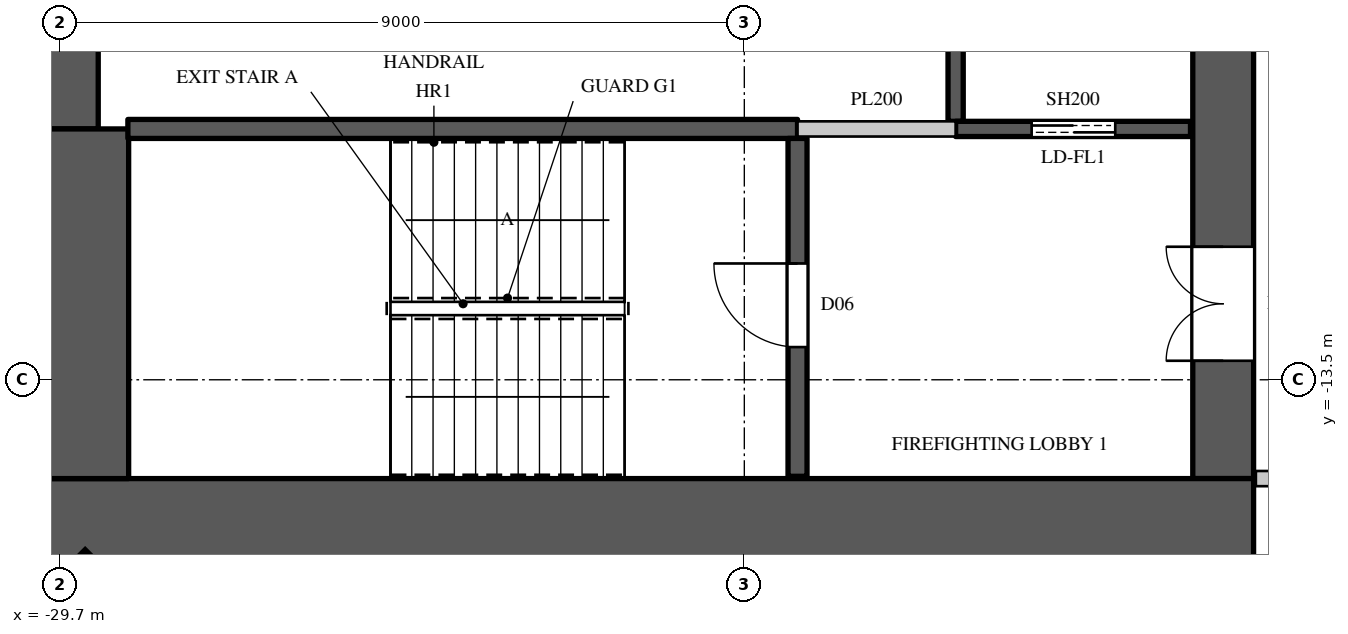
"""IFC4 building model, lengths in metres.
Left out: names, types, materials, properties, quantities, classifications, styles, units other than length and angle.
Written with IfcOpenShell. Run it as: python <this file> out.ifc"""

import sys

from ifc_helpers import new_model, si_unit, direction, frame, frame_2d, origin, origin_2d, place, context, subcontext, project, spatial, rectangle, extrude, element, fill, save


model = new_model("IFC4")
c1 = context("Model", 3, precision=1e-05, world=origin(), true_north=direction((0.0, 1.0)))
c2 = subcontext(c1, "Body", "Model", "MODEL_VIEW")
j1 = project(units=[si_unit("LENGTHUNIT", "METRE"), si_unit("PLANEANGLEUNIT", "RADIAN")], contexts=[c1])
p1 = place(None, origin())
s1 = spatial("IfcSite", under=j1, at=p1, CompositionType="ELEMENT")
p2 = place(p1, origin())
s2 = spatial("IfcBuilding", under=s1, at=p2, CompositionType="ELEMENT")
p3 = place(p2, frame((0.0, 0.0, 197.4)))
s3 = spatial("IfcBuildingStorey", under=s2, at=p3, CompositionType="ELEMENT", Elevation=197.4)
p4 = place(p3, frame((-29.443, -16.443, 0.0), z_axis=(0.0, 0.0, 1.0), x_axis=(0.707106781187, -0.707106781187, 0.0)))
e1 = element("IfcColumn", 1, at=p4, inside=s3, PredefinedType="COLUMN", context=c2, shape_type="SweptSolid", body=[
    extrude(rectangle(XDim=0.9, YDim=1.1, at=origin_2d()), origin(), (0.0, 0.0, 1.0), 4.1),
])
p5 = place(p3, frame((-30.0, -15.4, 0.0), z_axis=(0.0, 0.0, 1.0), x_axis=(1.0, 0.0, 0.0)))
e2 = element("IfcWall", 2, at=p5, inside=s3, PredefinedType="SHEAR", context=c2, shape_type="SweptSolid", body=[
    extrude(rectangle(XDim=16.0, YDim=1.2, at=frame_2d((8.0, 0.0))), origin(), (0.0, 0.0, 1.0), 4.1),
])
p6 = place(p3, frame((-14.4, -14.8, 0.0), z_axis=(0.0, 0.0, 1.0), x_axis=(0.0, 1.0, 0.0)))
e3 = element("IfcWall", 3, at=p6, inside=s3, PredefinedType="SHEAR", context=c2, shape_type="SweptSolid", body=[
    extrude(rectangle(XDim=29.6, YDim=0.8, at=frame_2d((14.8, 0.0))), origin(), (0.0, 0.0, 1.0), 4.1),
])
p7 = place(p6, frame((1.55, 0.0, 0.0)))
e4 = element("IfcOpeningElement", 4, at=p7, cuts=e3, PredefinedType="OPENING", context=c2, shape_type="SweptSolid", body=[
    extrude(rectangle(XDim=1.5, YDim=2.4, at=frame_2d((0.75, 1.2))), frame((0.0, 0.41, 0.0), z_axis=(0.0, -1.0, 0.0), x_axis=(1.0, 0.0, 0.0)), (0.0, 0.0, 1.0), 0.82),
])
p8 = place(p6, frame((26.55, 0.0, 0.0)))
e5 = element("IfcOpeningElement", 5, at=p8, cuts=e3, PredefinedType="OPENING", context=c2, shape_type="SweptSolid", body=[
    extrude(rectangle(XDim=1.5, YDim=2.4, at=frame_2d((0.75, 1.2))), frame((0.0, 0.41, 0.0), z_axis=(0.0, -1.0, 0.0), x_axis=(1.0, 0.0, 0.0)), (0.0, 0.0, 1.0), 0.82),
])
p9 = place(p6, frame((8.45, 0.0, 0.0)))
e6 = element("IfcOpeningElement", 6, at=p9, cuts=e3, PredefinedType="OPENING", context=c2, shape_type="SweptSolid", body=[
    extrude(rectangle(XDim=1.5, YDim=2.4, at=frame_2d((0.75, 1.2))), frame((0.0, 0.41, 0.0), z_axis=(0.0, -1.0, 0.0), x_axis=(1.0, 0.0, 0.0)), (0.0, 0.0, 1.0), 0.82),
])
p10 = place(p6, frame((19.65, 0.0, 0.0)))
e7 = element("IfcOpeningElement", 7, at=p10, cuts=e3, PredefinedType="OPENING", context=c2, shape_type="SweptSolid", body=[
    extrude(rectangle(XDim=1.5, YDim=2.4, at=frame_2d((0.75, 1.2))), frame((0.0, 0.41, 0.0), z_axis=(0.0, -1.0, 0.0), x_axis=(1.0, 0.0, 0.0)), (0.0, 0.0, 1.0), 0.82),
])
p11 = place(p6, frame((14.5, 0.0, 0.0)))
e8 = element("IfcOpeningElement", 8, at=p11, cuts=e3, PredefinedType="OPENING", context=c2, shape_type="SweptSolid", body=[
    extrude(rectangle(XDim=0.6, YDim=2.0, at=frame_2d((0.3, 1.0))), frame((0.0, 0.41, 0.0), z_axis=(0.0, -1.0, 0.0), x_axis=(1.0, 0.0, 0.0)), (0.0, 0.0, 1.0), 0.82),
])
p12 = place(p3, frame((-29.6, -10.2, 0.0), z_axis=(0.0, 0.0, 1.0), x_axis=(0.0, 1.0, 0.0)))
e9 = element("IfcWall", 9, at=p12, inside=s3, PredefinedType="SHEAR", context=c2, shape_type="SweptSolid", body=[
    extrude(rectangle(XDim=20.4, YDim=0.8, at=frame_2d((10.2, 0.0))), origin(), (0.0, 0.0, 1.0), 4.1),
])
p13 = place(p3, frame((-29.4, -14.8, 0.0), z_axis=(0.0, 0.0, 1.0), x_axis=(0.0, 1.0, 0.0)))
e10 = element("IfcWall", 10, at=p13, inside=s3, PredefinedType="SHEAR", context=c2, shape_type="SweptSolid", body=[
    extrude(rectangle(XDim=4.6, YDim=1.2, at=frame_2d((2.3, 0.0))), origin(), (0.0, 0.0, 1.0), 4.1),
])
p14 = place(p3, frame((-13.97, -14.8, 0.0), z_axis=(0.0, 0.0, 1.0), x_axis=(1.0, 0.0, 0.0)))
e11 = element("IfcWall", 11, at=p14, inside=s3, PredefinedType="PARTITIONING", context=c2, shape_type="SweptSolid", body=[
    extrude(rectangle(XDim=2.87, YDim=0.2, at=frame_2d((1.435, 0.0))), origin(), (0.0, 0.0, 1.0), 3.8),
])
p15 = place(p3, frame((-20.0, -10.2, 0.0), z_axis=(0.0, 0.0, 1.0), x_axis=(1.0, 0.0, 0.0)))
e12 = element("IfcWall", 12, at=p15, inside=s3, PredefinedType="PARTITIONING", context=c2, shape_type="SweptSolid", body=[
    extrude(rectangle(XDim=2.08, YDim=0.2, at=frame_2d((1.04, 0.0))), origin(), (0.0, 0.0, 1.0), 3.8),
])
p16 = place(p3, frame((-17.92, -10.1, 0.0), z_axis=(0.0, 0.0, 1.0), x_axis=(0.0, 1.0, 0.0)))
e13 = element("IfcWall", 13, at=p16, inside=s3, PredefinedType="SHEAR", context=c2, shape_type="SweptSolid", body=[
    extrude(rectangle(XDim=2.6, YDim=0.2, at=frame_2d((1.3, 0.0))), origin(), (0.0, 0.0, 1.0), 3.8),
])
p17 = place(p3, frame((-17.92, -10.2, 0.0), z_axis=(0.0, 0.0, 1.0), x_axis=(1.0, 0.0, 0.0)))
e14 = element("IfcWall", 14, at=p17, inside=s3, PredefinedType="SHEAR", context=c2, shape_type="SweptSolid", body=[
    extrude(rectangle(XDim=3.09, YDim=0.2, at=frame_2d((1.545, 0.0))), origin(), (0.0, 0.0, 1.0), 3.8),
])
p18 = place(p17, frame((1.0, 0.0, 0.0)))
e15 = element("IfcOpeningElement", 15, at=p18, cuts=e14, PredefinedType="OPENING", context=c2, shape_type="SweptSolid", body=[
    extrude(rectangle(XDim=1.1, YDim=2.2, at=frame_2d((0.55, 1.1))), frame((0.0, 0.11, 0.0), z_axis=(0.0, -1.0, 0.0), x_axis=(1.0, 0.0, 0.0)), (0.0, 0.0, 1.0), 0.22),
])
p19 = place(p3, frame((-28.81, -10.2, 0.0), z_axis=(0.0, 0.0, 1.0), x_axis=(1.0, 0.0, 0.0)))
e16 = element("IfcWall", 16, at=p19, inside=s3, PredefinedType="SHEAR", context=c2, shape_type="SweptSolid", body=[
    extrude(rectangle(XDim=8.81, YDim=0.25, at=frame_2d((4.405, 0.0))), origin(), (0.0, 0.0, 1.0), 3.8),
])
p20 = place(p3, frame((-20.0, -14.77, 0.0), z_axis=(0.0, 0.0, 1.0), x_axis=(0.0, 1.0, 0.0)))
e17 = element("IfcWall", 17, at=p20, inside=s3, PredefinedType="SHEAR", context=c2, shape_type="SweptSolid", body=[
    extrude(rectangle(XDim=4.445, YDim=0.25, at=frame_2d((2.223, 0.0))), origin(), (0.0, 0.0, 1.0), 3.8),
])
p21 = place(p20, frame((1.7, 0.0, 0.0)))
e18 = element("IfcOpeningElement", 18, at=p21, cuts=e17, PredefinedType="OPENING", context=c2, shape_type="SweptSolid", body=[
    extrude(rectangle(XDim=1.1, YDim=2.2, at=frame_2d((0.55, 1.1))), frame((0.0, 0.135, 0.0), z_axis=(0.0, -1.0, 0.0), x_axis=(1.0, 0.0, 0.0)), (0.0, 0.0, 1.0), 0.27),
])
p22 = place(p21, origin())
e19 = element("IfcDoor", 19, at=p22, inside=s3, OperationType="SINGLE_SWING_RIGHT", PredefinedType="DOOR", context=c2, shape_type="SweptSolid", body=[
    extrude(rectangle(XDim=1.1, YDim=2.2, at=frame_2d((0.55, 1.1))), frame((0.0, 0.025, 0.0), z_axis=(0.0, -1.0, 0.0), x_axis=(1.0, 0.0, 0.0)), (0.0, 0.0, 1.0), 0.05),
])
fill(e18, e19)
p23 = place(p18, origin())
e20 = element("IfcDoor", 20, at=p23, inside=s3, OperationType="DOUBLE_DOOR_SLIDING", PredefinedType="DOOR", context=c2, shape_type="SweptSolid", body=[
    extrude(rectangle(XDim=1.1, YDim=2.2, at=frame_2d((0.55, 1.1))), frame((0.0, 0.025, 0.0), z_axis=(0.0, -1.0, 0.0), x_axis=(1.0, 0.0, 0.0)), (0.0, 0.0, 1.0), 0.05),
])
fill(e15, e20)
p24 = place(p7, origin())
e21 = element("IfcDoor", 21, at=p24, inside=s3, OperationType="DOUBLE_DOOR_SINGLE_SWING", PredefinedType="DOOR", context=c2, shape_type="SweptSolid", body=[
    extrude(rectangle(XDim=1.5, YDim=2.4, at=frame_2d((0.75, 1.2))), frame((0.0, 0.395, 0.0), z_axis=(0.0, -1.0, 0.0), x_axis=(1.0, 0.0, 0.0)), (0.0, 0.0, 1.0), 0.05),
])
fill(e4, e21)
save(model, sys.argv[1])
